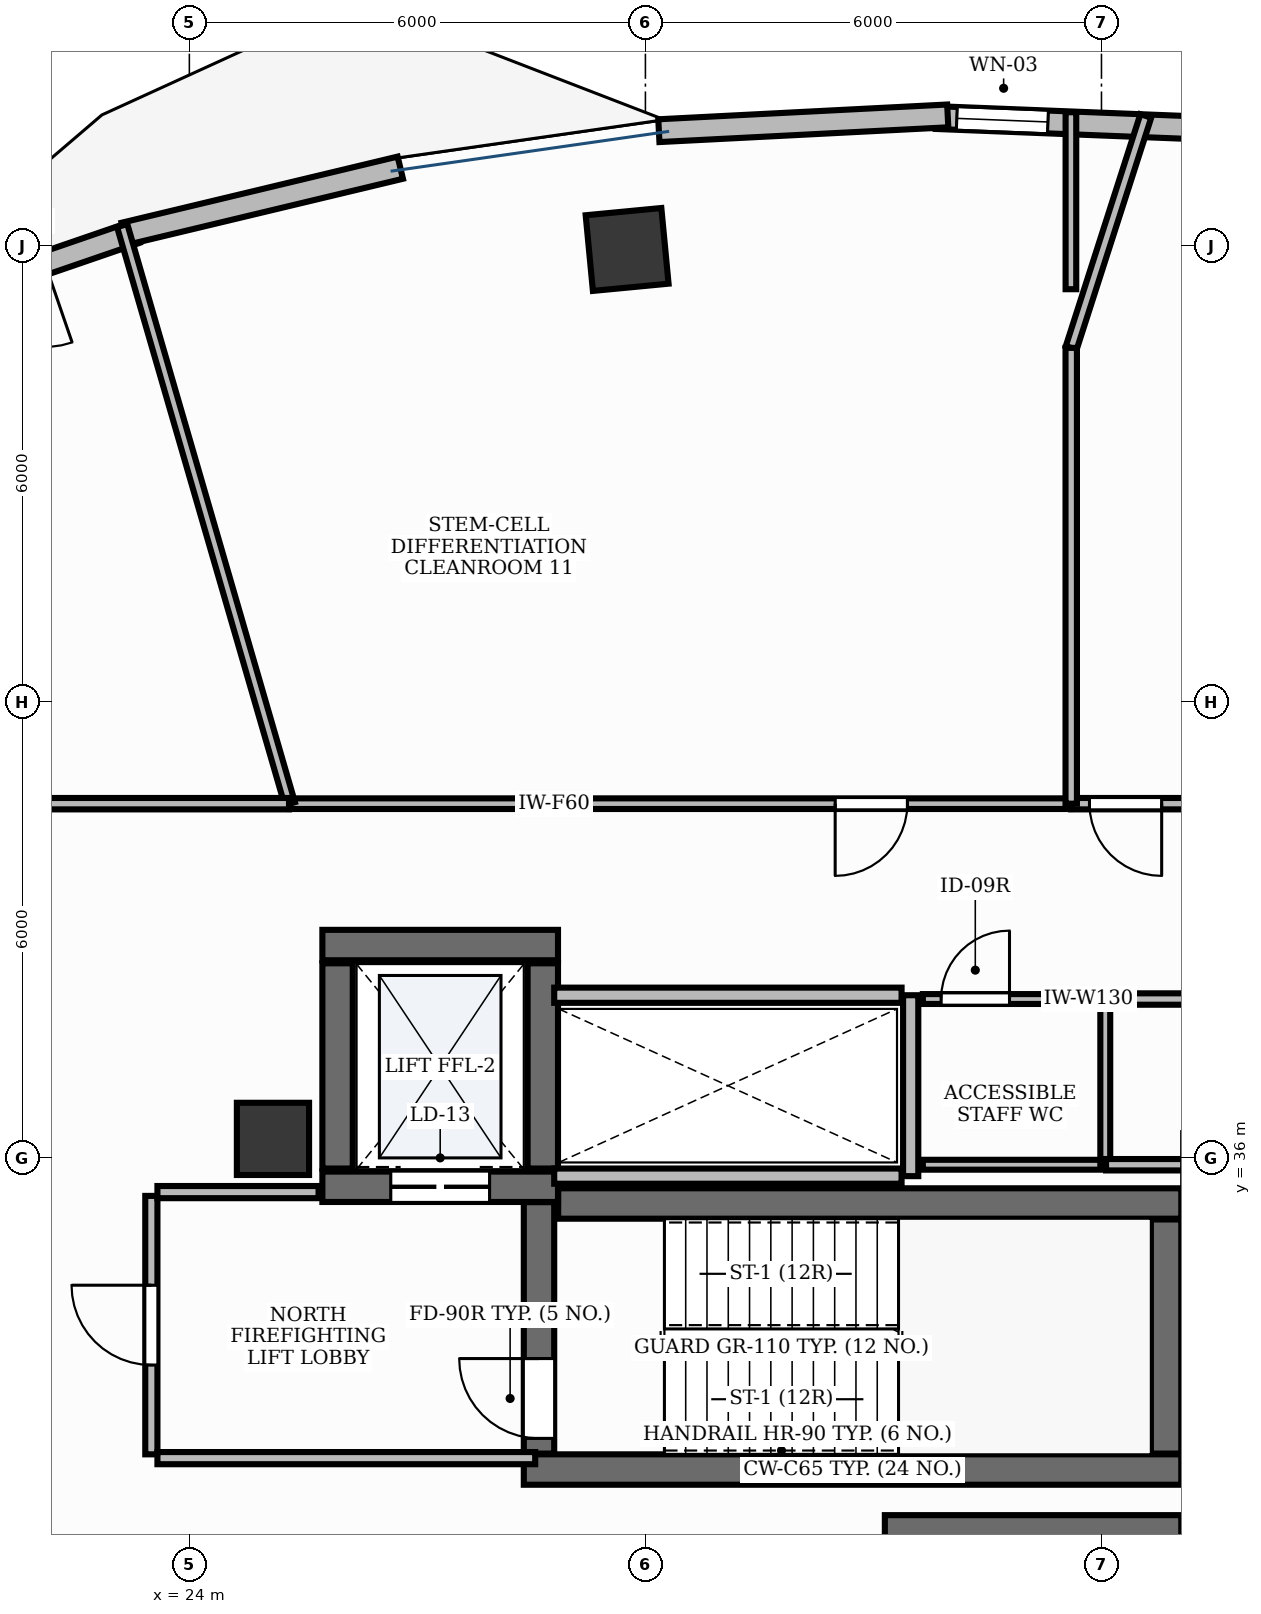
"""IFC4 building model, lengths in metres.
Left out: names, types, materials, properties, quantities, classifications, styles, units other than length and angle.
Written with IfcOpenShell. Run it as: python <this file> out.ifc"""

import sys

from ifc_helpers import new_model, si_unit, direction, frame, frame_2d, origin, origin_2d, place, context, subcontext, project, spatial, rectangle, extrude, element, fill, save


model = new_model("IFC4")
c1 = context("Model", 3, precision=1e-05, world=origin(), true_north=direction((0.0, 1.0)))
c2 = subcontext(c1, "Body", "Model", "MODEL_VIEW")
j1 = project(units=[si_unit("LENGTHUNIT", "METRE"), si_unit("PLANEANGLEUNIT", "RADIAN")], contexts=[c1])
p1 = place(None, origin())
s1 = spatial("IfcSite", under=j1, at=p1, CompositionType="ELEMENT")
p2 = place(p1, origin())
s2 = spatial("IfcBuilding", under=s1, at=p2, CompositionType="ELEMENT")
p3 = place(p2, frame((0.0, 0.0, 239.4)))
s3 = spatial("IfcBuildingStorey", under=s2, at=p3, CompositionType="ELEMENT", Elevation=239.4)
p4 = place(p3, frame((28.852, 35.4, 0.0), z_axis=(0.0, 0.0, 1.0), x_axis=(1.0, 0.0, 0.0)))
e1 = element("IfcWall", 1, at=p4, inside=s3, PredefinedType="SHEAR", context=c2, shape_type="SweptSolid", body=[
    extrude(rectangle(XDim=8.198, YDim=0.4, at=frame_2d((4.099, 0.0))), origin(), (0.0, 0.0, 1.0), 3.9),
])
p5 = place(p3, frame((28.4, 31.9, 0.0), z_axis=(0.0, 0.0, 1.0), x_axis=(1.0, 0.0, 0.0)))
e2 = element("IfcWall", 2, at=p5, inside=s3, PredefinedType="SHEAR", context=c2, shape_type="SweptSolid", body=[
    extrude(rectangle(XDim=8.65, YDim=0.4, at=frame_2d((4.325, 0.0))), origin(), (0.0, 0.0, 1.0), 3.9),
])
p6 = place(p3, frame((36.85, 32.11, 0.0), z_axis=(0.0, 0.0, 1.0), x_axis=(0.0, 1.0, 0.0)))
e3 = element("IfcWall", 3, at=p6, inside=s3, PredefinedType="SHEAR", context=c2, shape_type="SweptSolid", body=[
    extrude(rectangle(XDim=3.08, YDim=0.4, at=frame_2d((1.54, 0.0))), origin(), (0.0, 0.0, 1.0), 3.9),
])
p7 = place(p3, frame((28.6, 32.11, 0.0), z_axis=(0.0, 0.0, 1.0), x_axis=(0.0, 1.0, 0.0)))
e4 = element("IfcWall", 4, at=p7, inside=s3, PredefinedType="SHEAR", context=c2, shape_type="SweptSolid", body=[
    extrude(rectangle(XDim=3.308, YDim=0.4, at=frame_2d((1.654, 0.0))), origin(), (0.0, 0.0, 1.0), 3.9),
])
p8 = place(p7, frame((0.2, 0.0, 0.0)))
e5 = element("IfcOpeningElement", 5, at=p8, cuts=e4, PredefinedType="OPENING", context=c2, shape_type="SweptSolid", body=[
    extrude(rectangle(XDim=1.05, YDim=2.15, at=frame_2d((0.525, 1.075))), frame((0.0, 0.215, 0.0), z_axis=(0.0, -1.0, 0.0), x_axis=(1.0, 0.0, 0.0)), (0.0, 0.0, 1.0), 0.43),
])
p9 = place(p3, frame((33.15, 31.1, 0.0), z_axis=(0.0, 0.0, 1.0), x_axis=(1.0, 0.0, 0.0)))
e6 = element("IfcWall", 6, at=p9, inside=s3, PredefinedType="SHEAR", context=c2, shape_type="SweptSolid", body=[
    extrude(rectangle(XDim=3.9, YDim=0.4, at=frame_2d((1.95, 0.0))), origin(), (0.0, 0.0, 1.0), 3.9),
])
p10 = place(p3, frame((25.75, 38.8, 0.0), z_axis=(0.0, 0.0, 1.0), x_axis=(1.0, 0.0, 0.0)))
e7 = element("IfcWall", 7, at=p10, inside=s3, PredefinedType="SHEAR", context=c2, shape_type="SweptSolid", body=[
    extrude(rectangle(XDim=3.1, YDim=0.4, at=frame_2d((1.55, 0.0))), origin(), (0.0, 0.0, 1.0), 3.9),
])
p11 = place(p3, frame((25.75, 35.62, 0.0), z_axis=(0.0, 0.0, 1.0), x_axis=(1.0, 0.0, 0.0)))
e8 = element("IfcWall", 8, at=p11, inside=s3, PredefinedType="SHEAR", context=c2, shape_type="SweptSolid", body=[
    extrude(rectangle(XDim=3.1, YDim=0.4, at=frame_2d((1.55, 0.0))), origin(), (0.0, 0.0, 1.0), 3.9),
])
p12 = place(p11, frame((0.9, 0.0, 0.0)))
e9 = element("IfcOpeningElement", 9, at=p12, cuts=e8, PredefinedType="OPENING", context=c2, shape_type="SweptSolid", body=[
    extrude(rectangle(XDim=1.3, YDim=2.2, at=frame_2d((0.65, 1.1))), frame((0.0, 0.215, 0.0), z_axis=(0.0, -1.0, 0.0), x_axis=(1.0, 0.0, 0.0)), (0.0, 0.0, 1.0), 0.43),
])
for number, where, z_axis, x_axis in (
    (10, (25.95, 35.86, 0.0), (0.0, 0.0, 1.0), (0.0, 1.0, 0.0)),
    (11, (28.65, 35.86, 0.0), (0.0, 0.0, 1.0), (0.0, 1.0, 0.0)),
):
    element("IfcWall", number, at=place(p3, frame(where, z_axis=z_axis, x_axis=x_axis)), inside=s3, PredefinedType="SHEAR", context=c2, shape_type="SweptSolid", body=[
        extrude(rectangle(XDim=2.7, YDim=0.4, at=frame_2d((1.35, 0.0))), origin(), (0.0, 0.0, 1.0), 3.9),
    ])
p13 = place(p3, frame((25.1, 36.25, -0.0), z_axis=(0.0, 0.0, 1.0), x_axis=(1.0, 0.0, 0.0)))
e12 = element("IfcColumn", 12, at=p13, inside=s3, PredefinedType="PILASTER", context=c2, shape_type="SweptSolid", body=[
    extrude(rectangle(XDim=0.95, YDim=0.95, at=origin_2d()), origin(), (0.0, 0.0, 1.0), 3.901),
])
p14 = place(p3, frame((29.759, 47.951, -0.0), z_axis=(0.0, 0.0, 1.0), x_axis=(0.995462868748, 0.095150811579, 0.0)))
e13 = element("IfcColumn", 13, at=p14, inside=s3, PredefinedType="COLUMN", context=c2, shape_type="SweptSolid", body=[
    extrude(rectangle(XDim=1.0, YDim=1.0, at=origin_2d()), origin(), (0.0, 0.0, 1.0), 3.901),
])
p15 = place(p3, frame((37.588, 49.538, 0.0), z_axis=(0.0, 0.0, 1.0), x_axis=(-0.999223368644, 0.03940380128, 0.0)))
e14 = element("IfcWall", 14, at=p15, inside=s3, PredefinedType="STANDARD", context=c2, shape_type="SweptSolid", body=[
    extrude(rectangle(XDim=3.767, YDim=0.3, at=frame_2d((1.884, 0.0))), origin(), (0.0, 0.0, 1.0), 3.9),
])
p16 = place(p15, frame((2.294, 0.0, 0.9)))
e15 = element("IfcOpeningElement", 15, at=p16, cuts=e14, PredefinedType="OPENING", context=c2, shape_type="SweptSolid", body=[
    extrude(rectangle(XDim=1.2, YDim=2.7, at=frame_2d((0.6, 1.35))), frame((0.0, 0.165, 0.0), z_axis=(0.0, -1.0, 0.0), x_axis=(1.0, 0.0, 0.0)), (0.0, 0.0, 1.0), 0.33),
])
p17 = place(p3, frame((23.296, 48.18, 0.0), z_axis=(0.0, 0.0, 1.0), x_axis=(-0.945702753898, -0.325032769531, 0.0)))
e16 = element("IfcWall", 16, at=p17, inside=s3, PredefinedType="STANDARD", context=c2, shape_type="SweptSolid", body=[
    extrude(rectangle(XDim=3.629, YDim=0.3, at=frame_2d((1.815, 0.0))), origin(), (0.0, 0.0, 1.0), 3.9),
])
p18 = place(p17, frame((1.265, 0.0, 0.0)))
e17 = element("IfcOpeningElement", 17, at=p18, cuts=e16, PredefinedType="OPENING", context=c2, shape_type="SweptSolid", body=[
    extrude(rectangle(XDim=1.1, YDim=2.15, at=frame_2d((0.55, 1.075))), frame((0.0, 0.165, 0.0), z_axis=(0.0, -1.0, 0.0), x_axis=(1.0, 0.0, 0.0)), (0.0, 0.0, 1.0), 0.33),
])
p19 = place(p3, frame((33.977, 49.708, 0.0), z_axis=(0.0, 0.0, 1.0), x_axis=(-0.998691783215, -0.051134353798, 0.0)))
e18 = element("IfcWall", 18, at=p19, inside=s3, PredefinedType="STANDARD", context=c2, shape_type="SweptSolid", body=[
    extrude(rectangle(XDim=3.805, YDim=0.3, at=frame_2d((1.903, 0.0))), origin(), (0.0, 0.0, 1.0), 3.9),
])
p20 = place(p3, frame((26.775, 49.027, 0.0), z_axis=(0.0, 0.0, 1.0), x_axis=(-0.972475629939, -0.233004611918, 0.0)))
e19 = element("IfcWall", 19, at=p20, inside=s3, PredefinedType="STANDARD", context=c2, shape_type="SweptSolid", body=[
    extrude(rectangle(XDim=3.735, YDim=0.3, at=frame_2d((1.868, 0.0))), origin(), (0.0, 0.0, 1.0), 3.9),
])
p21 = place(p3, frame((33.49, 35.76, 0.0), z_axis=(0.0, 0.0, 1.0), x_axis=(0.0, 1.0, 0.0)))
e20 = element("IfcWall", 20, at=p21, inside=s3, PredefinedType="PARTITIONING", context=c2, shape_type="SweptSolid", body=[
    extrude(rectangle(XDim=2.38, YDim=0.2, at=frame_2d((1.19, 0.0))), origin(), (0.0, 0.0, 1.0), 2.22),
])
for number, where, z_axis, x_axis in (
    (21, (28.8, 35.76, 0.0), (0.0, 0.0, 1.0), (1.0, 0.0, 0.0)),
    (22, (28.8, 38.14, 0.0), (0.0, 0.0, 1.0), (1.0, 0.0, 0.0)),
):
    element("IfcWall", number, at=place(p3, frame(where, z_axis=z_axis, x_axis=x_axis)), inside=s3, PredefinedType="PARTITIONING", context=c2, shape_type="SweptSolid", body=[
        extrude(rectangle(XDim=4.57, YDim=0.2, at=frame_2d((2.285, 0.0))), origin(), (0.0, 0.0, 1.0), 2.22),
    ])
p22 = place(p3, frame((23.5, 32.1, 0.0), z_axis=(0.0, 0.0, 1.0), x_axis=(0.0, 1.0, 0.0)))
e23 = element("IfcWall", 23, at=p22, inside=s3, PredefinedType="PARTITIONING", context=c2, shape_type="SweptSolid", body=[
    extrude(rectangle(XDim=3.4, YDim=0.16, at=frame_2d((1.7, 0.0))), origin(), (0.0, 0.0, 1.0), 2.22),
])
p23 = place(p22, frame((1.175, 0.0, 0.0)))
e24 = element("IfcOpeningElement", 24, at=p23, cuts=e23, PredefinedType="OPENING", context=c2, shape_type="SweptSolid", body=[
    extrude(rectangle(XDim=1.05, YDim=2.15, at=frame_2d((0.525, 1.075))), frame((0.0, 0.095, 0.0), z_axis=(0.0, -1.0, 0.0), x_axis=(1.0, 0.0, 0.0)), (0.0, 0.0, 1.0), 0.19),
])
p24 = place(p3, frame((23.58, 32.05, 0.0), z_axis=(0.0, 0.0, 1.0), x_axis=(1.0, 0.0, 0.0)))
e25 = element("IfcWall", 25, at=p24, inside=s3, PredefinedType="PARTITIONING", context=c2, shape_type="SweptSolid", body=[
    extrude(rectangle(XDim=4.97, YDim=0.16, at=frame_2d((2.485, 0.0))), origin(), (0.0, 0.0, 1.0), 2.22),
])
p25 = place(p3, frame((23.58, 35.55, 0.0), z_axis=(0.0, 0.0, 1.0), x_axis=(1.0, 0.0, 0.0)))
e26 = element("IfcWall", 26, at=p25, inside=s3, PredefinedType="PARTITIONING", context=c2, shape_type="SweptSolid", body=[
    extrude(rectangle(XDim=2.12, YDim=0.16, at=frame_2d((1.06, 0.0))), origin(), (0.0, 0.0, 1.0), 2.22),
])
p26 = place(p3, frame((33.65, 38.09, 0.0), z_axis=(0.0, 0.0, 1.0), x_axis=(1.0, 0.0, 0.0)))
e27 = element("IfcWall", 27, at=p26, inside=s3, PredefinedType="PARTITIONING", context=c2, shape_type="SweptSolid", body=[
    extrude(rectangle(XDim=2.4, YDim=0.13, at=frame_2d((1.2, 0.0))), origin(), (0.0, 0.0, 1.0), 2.22),
])
p27 = place(p26, frame((0.24, 0.0, 0.0)))
e28 = element("IfcOpeningElement", 28, at=p27, cuts=e27, PredefinedType="OPENING", context=c2, shape_type="SweptSolid", body=[
    extrude(rectangle(XDim=0.9, YDim=2.15, at=frame_2d((0.45, 1.075))), frame((0.0, 0.08, 0.0), z_axis=(0.0, -1.0, 0.0), x_axis=(1.0, 0.0, 0.0)), (0.0, 0.0, 1.0), 0.16),
])
p28 = place(p3, frame((37.2, 40.66, 0.0), z_axis=(0.0, 0.0, 1.0), x_axis=(-1.0, 0.0, 0.0)))
e29 = element("IfcWall", 29, at=p28, inside=s3, PredefinedType="PARTITIONING", context=c2, shape_type="SweptSolid", body=[
    extrude(rectangle(XDim=1.598, YDim=0.15, at=frame_2d((0.799, 0.0))), origin(), (0.0, 0.0, 1.0), 2.22),
])
p29 = place(p28, frame((0.408, 0.0, 0.0)))
e30 = element("IfcOpeningElement", 30, at=p29, cuts=e29, PredefinedType="OPENING", context=c2, shape_type="SweptSolid", body=[
    extrude(rectangle(XDim=0.95, YDim=2.15, at=frame_2d((0.475, 1.075))), frame((0.0, 0.09, 0.0), z_axis=(0.0, -1.0, 0.0), x_axis=(1.0, 0.0, 0.0)), (0.0, 0.0, 1.0), 0.18),
])
p30 = place(p3, frame((35.592, 40.66, 0.0), z_axis=(0.0, 0.0, 1.0), x_axis=(-1.0, 0.0, 0.0)))
e31 = element("IfcWall", 31, at=p30, inside=s3, PredefinedType="PARTITIONING", context=c2, shape_type="SweptSolid", body=[
    extrude(rectangle(XDim=10.271, YDim=0.14, at=frame_2d((5.135, 0.0))), origin(), (0.0, 0.0, 1.0), 2.22),
])
p31 = place(p30, frame((2.146, 0.0, 0.0)))
e32 = element("IfcOpeningElement", 32, at=p31, cuts=e31, PredefinedType="OPENING", context=c2, shape_type="SweptSolid", body=[
    extrude(rectangle(XDim=0.95, YDim=2.15, at=frame_2d((0.475, 1.075))), frame((0.0, 0.085, 0.0), z_axis=(0.0, -1.0, 0.0), x_axis=(1.0, 0.0, 0.0)), (0.0, 0.0, 1.0), 0.17),
])
p32 = place(p3, frame((36.05, 35.91, 0.0), z_axis=(0.0, 0.0, 1.0), x_axis=(-1.0, 0.0, 0.0)))
e33 = element("IfcWall", 33, at=p32, inside=s3, PredefinedType="PARTITIONING", context=c2, shape_type="SweptSolid", body=[
    extrude(rectangle(XDim=2.4, YDim=0.13, at=frame_2d((1.2, 0.0))), origin(), (0.0, 0.0, 1.0), 2.22),
])
p33 = place(p3, frame((36.05, 38.09, 0.0), z_axis=(0.0, 0.0, 1.0), x_axis=(0.0, -1.0, 0.0)))
e34 = element("IfcWall", 34, at=p33, inside=s3, PredefinedType="PARTITIONING", context=c2, shape_type="SweptSolid", body=[
    extrude(rectangle(XDim=2.18, YDim=0.13, at=frame_2d((1.09, 0.0))), origin(), (0.0, 0.0, 1.0), 2.22),
])
p34 = place(p3, frame((35.602, 46.657, 0.0), z_axis=(0.0, 0.0, 1.0), x_axis=(0.306063425715, 0.95201112359, 0.0)))
e35 = element("IfcWall", 35, at=p34, inside=s3, PredefinedType="PARTITIONING", context=c2, shape_type="SweptSolid", body=[
    extrude(rectangle(XDim=3.205, YDim=0.15, at=frame_2d((1.603, 0.0))), origin(), (0.0, 0.0, 1.0), 2.22),
])
p35 = place(p3, frame((37.35, 35.91, 0.0), z_axis=(0.0, 0.0, 1.0), x_axis=(-1.0, 0.0, 0.0)))
e36 = element("IfcWall", 36, at=p35, inside=s3, PredefinedType="PARTITIONING", context=c2, shape_type="SweptSolid", body=[
    extrude(rectangle(XDim=1.29, YDim=0.15, at=frame_2d((0.645, 0.0))), origin(), (0.0, 0.0, 1.0), 2.22),
])
p36 = place(p3, frame((36.06, 38.09, 0.0), z_axis=(0.0, 0.0, 1.0), x_axis=(1.0, 0.0, 0.0)))
e37 = element("IfcWall", 37, at=p36, inside=s3, PredefinedType="PARTITIONING", context=c2, shape_type="SweptSolid", body=[
    extrude(rectangle(XDim=1.14, YDim=0.15, at=frame_2d((0.57, 0.0))), origin(), (0.0, 0.0, 1.0), 2.22),
])
p37 = place(p3, frame((35.602, 40.66, 0.0), z_axis=(0.0, 0.0, 1.0), x_axis=(0.0, 1.0, 0.0)))
e38 = element("IfcWall", 38, at=p37, inside=s3, PredefinedType="PARTITIONING", context=c2, shape_type="SweptSolid", body=[
    extrude(rectangle(XDim=5.997, YDim=0.15, at=frame_2d((2.998, 0.0))), origin(), (0.0, 0.0, 1.0), 2.22),
])
p38 = place(p3, frame((35.598, 49.757, 0.0), z_axis=(0.0, 0.0, 1.0), x_axis=(0.0, -1.0, 0.0)))
e39 = element("IfcWall", 39, at=p38, inside=s3, PredefinedType="PARTITIONING", context=c2, shape_type="SweptSolid", body=[
    extrude(rectangle(XDim=2.328, YDim=0.14, at=frame_2d((1.164, 0.0))), origin(), (0.0, 0.0, 1.0), 2.22),
])
p39 = place(p3, frame((25.322, 40.66, 0.0), z_axis=(0.0, 0.0, 1.0), x_axis=(-0.278465296123, 0.960446291499, 0.0)))
e40 = element("IfcWall", 40, at=p39, inside=s3, PredefinedType="PARTITIONING", context=c2, shape_type="SweptSolid", body=[
    extrude(rectangle(XDim=7.919, YDim=0.14, at=frame_2d((3.959, 0.0))), origin(), (0.0, 0.0, 1.0), 2.22),
])
p40 = place(p3, frame((25.311, 40.66, 0.0), z_axis=(0.0, 0.0, 1.0), x_axis=(-1.0, 0.0, 0.0)))
e41 = element("IfcWall", 41, at=p40, inside=s3, PredefinedType="PARTITIONING", context=c2, shape_type="SweptSolid", body=[
    extrude(rectangle(XDim=3.561, YDim=0.15, at=frame_2d((1.781, 0.0))), origin(), (0.0, 0.0, 1.0), 2.22),
])
p41 = place(p16, origin())
e42 = element("IfcWindow", 42, at=p41, inside=s3, PartitioningType="SINGLE_PANEL", PredefinedType="WINDOW", context=c2, shape_type="SweptSolid", body=[
    extrude(rectangle(XDim=1.2, YDim=2.7, at=frame_2d((0.6, 1.35))), frame((0.0, 0.03, 0.0), z_axis=(0.0, -1.0, 0.0), x_axis=(1.0, 0.0, 0.0)), (0.0, 0.0, 1.0), 0.06),
])
fill(e15, e42)
p42 = place(p8, origin())
e43 = element("IfcDoor", 43, at=p42, inside=s3, OperationType="SINGLE_SWING_RIGHT", PredefinedType="DOOR", context=c2, shape_type="SweptSolid", body=[
    extrude(rectangle(XDim=1.05, YDim=2.15, at=frame_2d((0.525, 1.075))), frame((0.0, 0.025, 0.0), z_axis=(0.0, -1.0, 0.0), x_axis=(1.0, 0.0, 0.0)), (0.0, 0.0, 1.0), 0.05),
])
fill(e5, e43)
p43 = place(p12, origin())
e44 = element("IfcDoor", 44, at=p43, inside=s3, OperationType="DOUBLE_DOOR_SLIDING", PredefinedType="DOOR", context=c2, shape_type="SweptSolid", body=[
    extrude(rectangle(XDim=1.3, YDim=2.2, at=frame_2d((0.65, 1.1))), frame((0.0, 0.025, 0.0), z_axis=(0.0, -1.0, 0.0), x_axis=(1.0, 0.0, 0.0)), (0.0, 0.0, 1.0), 0.05),
])
fill(e9, e44)
p44 = place(p23, origin())
e45 = element("IfcDoor", 45, at=p44, inside=s3, OperationType="SINGLE_SWING_RIGHT", PredefinedType="DOOR", context=c2, shape_type="SweptSolid", body=[
    extrude(rectangle(XDim=1.05, YDim=2.15, at=frame_2d((0.525, 1.075))), frame((0.0, 0.025, 0.0), z_axis=(0.0, -1.0, 0.0), x_axis=(1.0, 0.0, 0.0)), (0.0, 0.0, 1.0), 0.05),
])
fill(e24, e45)
p45 = place(p27, origin())
e46 = element("IfcDoor", 46, at=p45, inside=s3, OperationType="SINGLE_SWING_RIGHT", PredefinedType="DOOR", context=c2, shape_type="SweptSolid", body=[
    extrude(rectangle(XDim=0.9, YDim=2.15, at=frame_2d((0.45, 1.075))), frame((0.0, 0.025, 0.0), z_axis=(0.0, -1.0, 0.0), x_axis=(1.0, 0.0, 0.0)), (0.0, 0.0, 1.0), 0.05),
])
fill(e28, e46)
p46 = place(p29, origin())
e47 = element("IfcDoor", 47, at=p46, inside=s3, OperationType="SINGLE_SWING_LEFT", PredefinedType="DOOR", context=c2, shape_type="SweptSolid", body=[
    extrude(rectangle(XDim=0.95, YDim=2.15, at=frame_2d((0.475, 1.075))), frame((0.0, 0.025, 0.0), z_axis=(0.0, -1.0, 0.0), x_axis=(1.0, 0.0, 0.0)), (0.0, 0.0, 1.0), 0.05),
])
fill(e30, e47)
p47 = place(p31, origin())
e48 = element("IfcDoor", 48, at=p47, inside=s3, OperationType="SINGLE_SWING_RIGHT", PredefinedType="DOOR", context=c2, shape_type="SweptSolid", body=[
    extrude(rectangle(XDim=0.95, YDim=2.15, at=frame_2d((0.475, 1.075))), frame((0.0, 0.025, 0.0), z_axis=(0.0, -1.0, 0.0), x_axis=(1.0, 0.0, 0.0)), (0.0, 0.0, 1.0), 0.05),
])
fill(e32, e48)
save(model, sys.argv[1])
